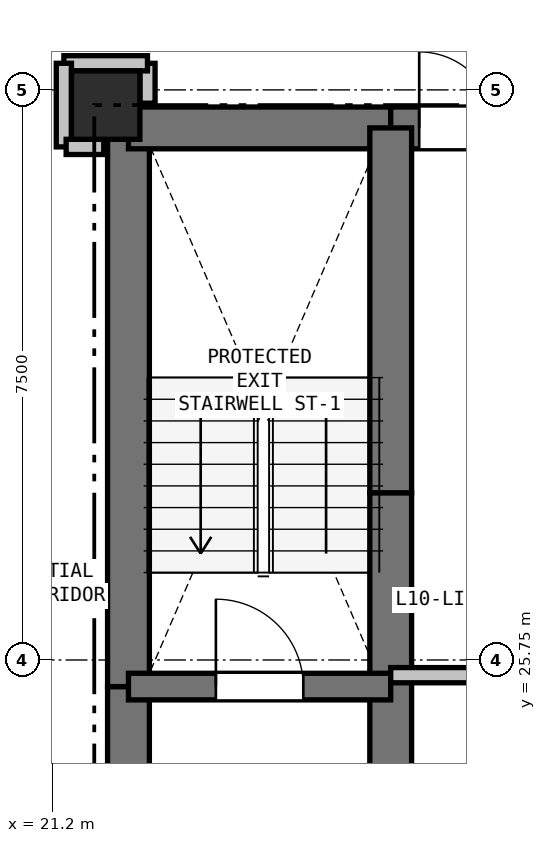
"""IFC4 building model, lengths in metres.
Left out: names, types, materials, properties, quantities, classifications, styles, units other than length and angle.
Written with IfcOpenShell. Run it as: python <this file> out.ifc"""

import sys

from ifc_helpers import new_model, si_unit, direction, frame, frame_2d, origin, origin_2d, place, context, subcontext, project, spatial, rectangle, extrude, element, fill, save


model = new_model("IFC4")
c1 = context("Model", 3, precision=1e-05, world=origin(), true_north=direction((0.0, 1.0)))
c2 = subcontext(c1, "Body", "Model", "MODEL_VIEW")
j1 = project(units=[si_unit("LENGTHUNIT", "METRE"), si_unit("PLANEANGLEUNIT", "RADIAN")], contexts=[c1])
p1 = place(None, origin())
s1 = spatial("IfcSite", under=j1, at=p1, CompositionType="ELEMENT")
p2 = place(p1, origin())
s2 = spatial("IfcBuilding", under=s1, at=p2, CompositionType="ELEMENT")
p3 = place(p2, frame((0.0, 0.0, 39.0)))
s3 = spatial("IfcBuildingStorey", under=s2, at=p3, CompositionType="ELEMENT", Elevation=39.0)
p4 = place(p3, frame((21.9, 33.05, 0.0), z_axis=(0.0, 0.0, 1.0), x_axis=(1.0, 0.0, 0.0)))
e1 = element("IfcColumn", 1, at=p4, inside=s3, PredefinedType="COLUMN", context=c2, shape_type="SweptSolid", body=[
    extrude(rectangle(XDim=0.9, YDim=0.9, at=origin_2d()), origin(), (0.0, 0.0, 1.0), 3.3),
])
p5 = place(p3, frame((22.2, 20.75, 0.0), z_axis=(0.0, 0.0, 1.0), x_axis=(0.0, 1.0, 0.0)))
e2 = element("IfcWall", 2, at=p5, inside=s3, PredefinedType="SHEAR", context=c2, shape_type="SweptSolid", body=[
    extrude(rectangle(XDim=4.65, YDim=0.55, at=frame_2d((2.325, 0.0))), origin(), (0.0, 0.0, 1.0), 3.04),
])
p6 = place(p3, frame((22.2, 25.4, 0.0), z_axis=(0.0, 0.0, 1.0), x_axis=(0.0, 1.0, 0.0)))
e3 = element("IfcWall", 3, at=p6, inside=s3, PredefinedType="SHEAR", context=c2, shape_type="SweptSolid", body=[
    extrude(rectangle(XDim=7.35, YDim=0.55, at=frame_2d((3.675, 0.0))), origin(), (0.0, 0.0, 1.0), 3.04),
])
p7 = place(p3, frame((22.2, 32.75, 0.0), z_axis=(0.0, 0.0, 1.0), x_axis=(1.0, 0.0, 0.0)))
e4 = element("IfcWall", 4, at=p7, inside=s3, PredefinedType="SHEAR", context=c2, shape_type="SweptSolid", body=[
    extrude(rectangle(XDim=3.45, YDim=0.55, at=frame_2d((1.725, 0.0))), origin(), (0.0, 0.0, 1.0), 3.04),
])
p8 = place(p3, frame((25.65, 32.75, 0.0), z_axis=(0.0, 0.0, 1.0), x_axis=(1.0, 0.0, 0.0)))
e5 = element("IfcWall", 5, at=p8, inside=s3, PredefinedType="SHEAR", context=c2, shape_type="SweptSolid", body=[
    extrude(rectangle(XDim=1.75, YDim=0.55, at=frame_2d((0.875, 0.0))), origin(), (0.0, 0.0, 1.0), 3.04),
])
p9 = place(p8, frame((0.375, 0.0, 0.0)))
e6 = element("IfcOpeningElement", 6, at=p9, cuts=e5, PredefinedType="OPENING", context=c2, shape_type="SweptSolid", body=[
    extrude(rectangle(XDim=1.0, YDim=2.15, at=frame_2d((0.5, 1.075))), frame((0.0, 0.285, 0.0), z_axis=(0.0, -1.0, 0.0), x_axis=(1.0, 0.0, 0.0)), (0.0, 0.0, 1.0), 0.57),
])
p10 = place(p3, frame((25.65, 22.75, 0.0), z_axis=(0.0, 0.0, 1.0), x_axis=(0.0, 1.0, 0.0)))
e7 = element("IfcWall", 7, at=p10, inside=s3, PredefinedType="SHEAR", context=c2, shape_type="SweptSolid", body=[
    extrude(rectangle(XDim=2.8, YDim=0.55, at=frame_2d((1.4, 0.0))), origin(), (0.0, 0.0, 1.0), 3.04),
])
p11 = place(p3, frame((25.65, 25.55, 0.0), z_axis=(0.0, 0.0, 1.0), x_axis=(0.0, 1.0, 0.0)))
e8 = element("IfcWall", 8, at=p11, inside=s3, PredefinedType="SHEAR", context=c2, shape_type="SweptSolid", body=[
    extrude(rectangle(XDim=2.4, YDim=0.55, at=frame_2d((1.2, 0.0))), origin(), (0.0, 0.0, 1.0), 3.04),
])
p12 = place(p3, frame((25.65, 27.95, 0.0), z_axis=(0.0, 0.0, 1.0), x_axis=(0.0, 1.0, 0.0)))
e9 = element("IfcWall", 9, at=p12, inside=s3, PredefinedType="SHEAR", context=c2, shape_type="SweptSolid", body=[
    extrude(rectangle(XDim=4.8, YDim=0.55, at=frame_2d((2.4, 0.0))), origin(), (0.0, 0.0, 1.0), 3.04),
])
p13 = place(p3, frame((22.2, 25.4, 0.0), z_axis=(0.0, 0.0, 1.0), x_axis=(1.0, 0.0, 0.0)))
e10 = element("IfcWall", 10, at=p13, inside=s3, PredefinedType="SHEAR", context=c2, shape_type="SweptSolid", body=[
    extrude(rectangle(XDim=3.45, YDim=0.35, at=frame_2d((1.725, 0.0))), origin(), (0.0, 0.0, 1.0), 3.04),
])
p14 = place(p13, frame((1.15, 0.0, 0.0)))
e11 = element("IfcOpeningElement", 11, at=p14, cuts=e10, PredefinedType="OPENING", context=c2, shape_type="SweptSolid", body=[
    extrude(rectangle(XDim=1.15, YDim=2.15, at=frame_2d((0.575, 1.075))), frame((0.0, 0.185, 0.0), z_axis=(0.0, -1.0, 0.0), x_axis=(1.0, 0.0, 0.0)), (0.0, 0.0, 1.0), 0.37),
])
p15 = place(p3, frame((25.65, 25.55, 0.0), z_axis=(0.0, 0.0, 1.0), x_axis=(1.0, 0.0, 0.0)))
e12 = element("IfcWall", 12, at=p15, inside=s3, PredefinedType="PARTITIONING", context=c2, shape_type="SweptSolid", body=[
    extrude(rectangle(XDim=4.95, YDim=0.2, at=frame_2d((2.475, 0.0))), origin(), (0.0, 0.0, 1.0), 3.04),
])
p16 = place(p3, frame((22.45, 33.075, 0.0), z_axis=(0.0, 0.0, 1.0), x_axis=(0.0, 1.0, 0.0)))
e13 = element("IfcWall", 13, at=p16, inside=s3, PredefinedType="PARTITIONING", context=c2, shape_type="SweptSolid", body=[
    extrude(rectangle(XDim=0.525, YDim=0.2, at=frame_2d((0.263, 0.0))), origin(), (0.0, 0.0, 1.0), 2.488),
])
p17 = place(p3, frame((22.45, 33.6, 0.0), z_axis=(0.0, 0.0, 1.0), x_axis=(-1.0, 0.0, 0.0)))
e14 = element("IfcWall", 14, at=p17, inside=s3, PredefinedType="PARTITIONING", context=c2, shape_type="SweptSolid", body=[
    extrude(rectangle(XDim=1.1, YDim=0.2, at=frame_2d((0.55, 0.0))), origin(), (0.0, 0.0, 1.0), 3.04),
])
p18 = place(p3, frame((21.35, 33.6, 0.0), z_axis=(0.0, 0.0, 1.0), x_axis=(0.0, -1.0, 0.0)))
e15 = element("IfcWall", 15, at=p18, inside=s3, PredefinedType="PARTITIONING", context=c2, shape_type="SweptSolid", body=[
    extrude(rectangle(XDim=1.1, YDim=0.2, at=frame_2d((0.55, 0.0))), origin(), (0.0, 0.0, 1.0), 2.337),
])
p19 = place(p3, frame((21.38, 32.5, 0.0), z_axis=(0.0, 0.0, 1.0), x_axis=(1.0, 0.0, 0.0)))
e16 = element("IfcWall", 16, at=p19, inside=s3, PredefinedType="PARTITIONING", context=c2, shape_type="SweptSolid", body=[
    extrude(rectangle(XDim=0.495, YDim=0.2, at=frame_2d((0.248, 0.0))), origin(), (0.0, 0.0, 1.0), 2.488),
])
p20 = place(p9, origin())
e17 = element("IfcDoor", 17, at=p20, inside=s3, OperationType="SINGLE_SWING_LEFT", PredefinedType="DOOR", context=c2, shape_type="SweptSolid", body=[
    extrude(rectangle(XDim=1.0, YDim=2.15, at=frame_2d((0.5, 1.075))), frame((0.0, 0.025, 0.0), z_axis=(0.0, -1.0, 0.0), x_axis=(1.0, 0.0, 0.0)), (0.0, 0.0, 1.0), 0.05),
])
fill(e6, e17)
p21 = place(p14, origin())
e18 = element("IfcDoor", 18, at=p21, inside=s3, OperationType="SINGLE_SWING_LEFT", PredefinedType="DOOR", context=c2, shape_type="SweptSolid", body=[
    extrude(rectangle(XDim=1.15, YDim=2.15, at=frame_2d((0.575, 1.075))), frame((0.0, 0.025, 0.0), z_axis=(0.0, -1.0, 0.0), x_axis=(1.0, 0.0, 0.0)), (0.0, 0.0, 1.0), 0.05),
])
fill(e11, e18)
save(model, sys.argv[1])
